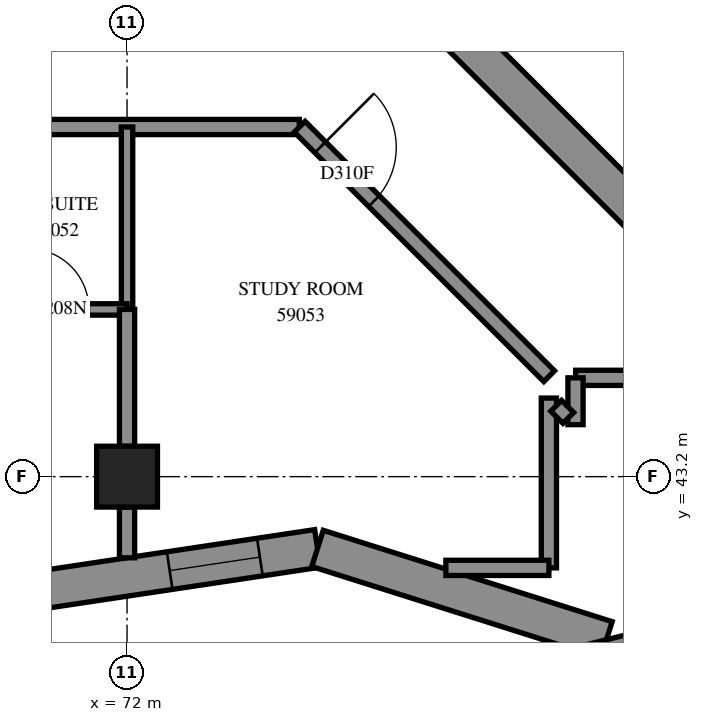
"""IFC4 building model, lengths in metres.
Left out: names, types, materials, properties, quantities, classifications, styles, units other than length and angle.
Written with IfcOpenShell. Run it as: python <this file> out.ifc"""

import sys

from ifc_helpers import new_model, si_unit, direction, frame, frame_2d, origin, origin_2d, place, context, subcontext, project, spatial, polyline, rectangle, outline, extrude, element, fill, save


model = new_model("IFC4")
c1 = context("Model", 3, precision=1e-05, world=origin(), true_north=direction((0.0, 1.0)))
c2 = subcontext(c1, "Body", "Model", "MODEL_VIEW")
j1 = project(units=[si_unit("LENGTHUNIT", "METRE"), si_unit("PLANEANGLEUNIT", "RADIAN")], contexts=[c1])
p1 = place(None, origin())
s1 = spatial("IfcSite", under=j1, at=p1, CompositionType="ELEMENT")
p2 = place(p1, origin())
s2 = spatial("IfcBuilding", under=s1, at=p2, CompositionType="ELEMENT")
p3 = place(p2, frame((0.0, 0.0, 216.8)))
s3 = spatial("IfcBuildingStorey", under=s2, at=p3, CompositionType="ELEMENT", Elevation=216.8)
p4 = place(p3, frame((72.0, 43.2, 0.0), z_axis=(0.0, 0.0, 1.0), x_axis=(1.0, 0.0, 0.0)))
e1 = element("IfcColumn", 1, at=p4, inside=s3, PredefinedType="COLUMN", context=c2, shape_type="SweptSolid", body=[
    extrude(rectangle(XDim=0.8, YDim=0.8, at=origin_2d()), origin(), (0.0, 0.0, 1.0), 3.1),
])
p5 = place(p3, frame((76.124, 49.267, -0.3), z_axis=(0.0, 0.0, 1.0), x_axis=(0.7071067812, -0.7071067812, 0.0)))
e2 = element("IfcWall", 2, at=p5, inside=s3, PredefinedType="SHEAR", context=c2, shape_type="SweptSolid", body=[
    extrude(rectangle(XDim=15.4, YDim=0.5, at=frame_2d((7.7, 0.0))), origin(), (0.0, 0.0, 1.0), 2.7),
])
p6 = place(p3, frame((70.873, 41.711, 0.0), z_axis=(0.0, 0.0, 1.0), x_axis=(0.9889307607, 0.1483777295, 0.0)))
e3 = element("IfcWall", 3, at=p6, inside=s3, PredefinedType="SOLIDWALL", context=c2, shape_type="SweptSolid", body=[
    extrude(outline(polyline([(-0.037, -0.25), (3.615, -0.25), (3.731, 0.25), (0.037, 0.25), (-0.037, -0.25)])), origin(), (0.0, 0.0, 1.0), 3.1),
])
p7 = place(p6, frame((1.706, 0.0, 0.45)))
e4 = element("IfcOpeningElement", 4, at=p7, cuts=e3, PredefinedType="OPENING", context=c2, shape_type="SweptSolid", body=[
    extrude(rectangle(XDim=1.2, YDim=2.5, at=frame_2d((0.6, 1.25))), frame((0.0, 0.26, 0.0), z_axis=(0.0, -1.0, 0.0), x_axis=(1.0, 0.0, 0.0)), (0.0, 0.0, 1.0), 0.52),
])
p8 = place(p3, frame((74.506, 42.256, 0.0), z_axis=(0.0, 0.0, 1.0), x_axis=(0.9534878351, -0.3014314985, 0.0)))
e5 = element("IfcWall", 5, at=p8, inside=s3, PredefinedType="SOLIDWALL", context=c2, shape_type="SweptSolid", body=[
    extrude(outline(polyline([(0.058, -0.25), (3.846, -0.25), (4.126, 0.25), (-0.058, 0.25), (0.058, -0.25)])), origin(), (0.0, 0.0, 1.0), 3.1),
])
p9 = place(p3, frame((78.307, 41.054, 0.0), z_axis=(0.0, 0.0, 1.0), x_axis=(0.2414327988, -0.9704175409, 0.0)))
e6 = element("IfcWall", 6, at=p9, inside=s3, PredefinedType="SOLIDWALL", context=c2, shape_type="SweptSolid", body=[
    extrude(outline(polyline([(0.14, -0.25), (4.796, -0.25), (4.508, 0.25), (-0.14, 0.25), (0.14, -0.25)])), origin(), (0.0, 0.0, 1.0), 3.1),
])
p10 = place(p9, frame((2.303, 0.0, 0.45)))
e7 = element("IfcOpeningElement", 7, at=p10, cuts=e6, PredefinedType="OPENING", context=c2, shape_type="SweptSolid", body=[
    extrude(rectangle(XDim=1.2, YDim=2.5, at=frame_2d((0.6, 1.25))), frame((0.0, 0.26, 0.0), z_axis=(0.0, -1.0, 0.0), x_axis=(1.0, 0.0, 0.0)), (0.0, 0.0, 1.0), 0.52),
])
p11 = place(p3, frame((55.0, 47.8, 0.0), z_axis=(0.0, 0.0, 1.0), x_axis=(1.0, 0.0, 0.0)))
e8 = element("IfcWall", 8, at=p11, inside=s3, PredefinedType="PARTITIONING", context=c2, shape_type="SweptSolid", body=[
    extrude(rectangle(XDim=19.266, YDim=0.2, at=frame_2d((9.633, 0.0))), origin(), (0.0, 0.0, 1.0), 3.1),
])
p12 = place(p11, frame((4.9, 0.0, 0.0)))
e9 = element("IfcOpeningElement", 9, at=p12, cuts=e8, PredefinedType="OPENING", context=c2, shape_type="SweptSolid", body=[
    extrude(rectangle(XDim=0.9, YDim=2.1, at=frame_2d((0.45, 1.05))), frame((0.0, 0.11, 0.0), z_axis=(0.0, -1.0, 0.0), x_axis=(1.0, 0.0, 0.0)), (0.0, 0.0, 1.0), 0.22),
])
p13 = place(p11, frame((8.457, 0.0, 0.0)))
e10 = element("IfcOpeningElement", 10, at=p13, cuts=e8, PredefinedType="OPENING", context=c2, shape_type="SweptSolid", body=[
    extrude(rectangle(XDim=0.9, YDim=2.1, at=frame_2d((0.45, 1.05))), frame((0.0, 0.11, 0.0), z_axis=(0.0, -1.0, 0.0), x_axis=(1.0, 0.0, 0.0)), (0.0, 0.0, 1.0), 0.22),
])
p14 = place(p11, frame((13.8, 0.0, 0.0)))
e11 = element("IfcOpeningElement", 11, at=p14, cuts=e8, PredefinedType="OPENING", context=c2, shape_type="SweptSolid", body=[
    extrude(rectangle(XDim=0.9, YDim=2.1, at=frame_2d((0.45, 1.05))), frame((0.0, 0.11, 0.0), z_axis=(0.0, -1.0, 0.0), x_axis=(1.0, 0.0, 0.0)), (0.0, 0.0, 1.0), 0.22),
])
p15 = place(p3, frame((74.272, 47.803, 0.0), z_axis=(0.0, 0.0, 1.0), x_axis=(0.7071067812, -0.7071067812, 0.0)))
e12 = element("IfcWall", 12, at=p15, inside=s3, PredefinedType="PARTITIONING", context=c2, shape_type="SweptSolid", body=[
    extrude(rectangle(XDim=4.641, YDim=0.2, at=frame_2d((2.321, 0.0))), origin(), (0.0, 0.0, 1.0), 3.1),
])
p16 = place(p15, frame((0.382, 0.0, 0.0)))
e13 = element("IfcOpeningElement", 13, at=p16, cuts=e12, PredefinedType="OPENING", context=c2, shape_type="SweptSolid", body=[
    extrude(rectangle(XDim=1.0, YDim=2.1, at=frame_2d((0.5, 1.05))), frame((0.0, 0.11, 0.0), z_axis=(0.0, -1.0, 0.0), x_axis=(1.0, 0.0, 0.0)), (0.0, 0.0, 1.0), 0.22),
])
p17 = place(p3, frame((77.902, 44.5, 0.0), z_axis=(0.0, 0.0, 1.0), x_axis=(1.0, 0.0, 0.0)))
e14 = element("IfcWall", 14, at=p17, inside=s3, PredefinedType="PARTITIONING", context=c2, shape_type="SweptSolid", body=[
    extrude(rectangle(XDim=2.522, YDim=0.2, at=frame_2d((1.261, 0.0))), origin(), (0.0, 0.0, 1.0), 3.1),
])
p18 = place(p3, frame((72.0, 45.4, 0.0), z_axis=(0.0, 0.0, 1.0), x_axis=(0.0, 1.0, 0.0)))
e15 = element("IfcWall", 15, at=p18, inside=s3, PredefinedType="PARTITIONING", context=c2, shape_type="SweptSolid", body=[
    extrude(rectangle(XDim=2.4, YDim=0.15, at=frame_2d((1.2, 0.0))), origin(), (0.0, 0.0, 1.0), 3.1),
])
p19 = place(p3, frame((77.55, 42.0, 0.0), z_axis=(0.0, 0.0, 1.0), x_axis=(0.0, 1.0, 0.0)))
e16 = element("IfcWall", 16, at=p19, inside=s3, PredefinedType="PARTITIONING", context=c2, shape_type="SweptSolid", body=[
    extrude(rectangle(XDim=2.234, YDim=0.2, at=frame_2d((1.117, 0.0))), origin(), (0.0, 0.0, 1.0), 3.1),
])
p20 = place(p3, frame((70.1, 45.4, 0.0), z_axis=(0.0, 0.0, 1.0), x_axis=(1.0, 0.0, 0.0)))
e17 = element("IfcWall", 17, at=p20, inside=s3, PredefinedType="PARTITIONING", context=c2, shape_type="SweptSolid", body=[
    extrude(rectangle(XDim=1.9, YDim=0.15, at=frame_2d((0.95, 0.0))), origin(), (0.0, 0.0, 1.0), 3.1),
])
p21 = place(p20, frame((0.598, 0.0, 0.0)))
e18 = element("IfcOpeningElement", 18, at=p21, cuts=e17, PredefinedType="OPENING", context=c2, shape_type="SweptSolid", body=[
    extrude(rectangle(XDim=0.8, YDim=2.1, at=frame_2d((0.4, 1.05))), frame((0.0, 0.085, 0.0), z_axis=(0.0, -1.0, 0.0), x_axis=(1.0, 0.0, 0.0)), (0.0, 0.0, 1.0), 0.17),
])
p22 = place(p3, frame((72.0, 43.6, 0.0), z_axis=(0.0, 0.0, 1.0), x_axis=(0.0, 1.0, 0.0)))
e19 = element("IfcWall", 19, at=p22, inside=s3, PredefinedType="PARTITIONING", context=c2, shape_type="SweptSolid", body=[
    extrude(rectangle(XDim=1.8, YDim=0.2, at=frame_2d((0.9, 0.0))), origin(), (0.0, 0.0, 1.0), 3.1),
])
p23 = place(p3, frame((76.194, 42.0, 0.0), z_axis=(0.0, 0.0, 1.0), x_axis=(1.0, 0.0, 0.0)))
e20 = element("IfcWall", 20, at=p23, inside=s3, PredefinedType="PARTITIONING", context=c2, shape_type="SweptSolid", body=[
    extrude(rectangle(XDim=1.356, YDim=0.2, at=frame_2d((0.678, 0.0))), origin(), (0.0, 0.0, 1.0), 3.1),
])
p24 = place(p3, frame((72.0, 42.133, 0.0), z_axis=(0.0, 0.0, 1.0), x_axis=(0.0, 1.0, 0.0)))
e21 = element("IfcWall", 21, at=p24, inside=s3, PredefinedType="PARTITIONING", context=c2, shape_type="SweptSolid", body=[
    extrude(rectangle(XDim=0.667, YDim=0.2, at=frame_2d((0.334, 0.0))), origin(), (0.0, 0.0, 1.0), 3.1),
])
p25 = place(p3, frame((77.9, 43.884, 0.0), z_axis=(0.0, 0.0, 1.0), x_axis=(0.0, 1.0, 0.0)))
e22 = element("IfcWall", 22, at=p25, inside=s3, PredefinedType="PARTITIONING", context=c2, shape_type="SweptSolid", body=[
    extrude(rectangle(XDim=0.616, YDim=0.2, at=frame_2d((0.308, 0.0))), origin(), (0.0, 0.0, 1.0), 3.1),
])
p26 = place(p3, frame((77.646, 44.132, 0.0), z_axis=(0.0, 0.0, 1.0), x_axis=(0.7068844555, -0.707329037, 0.0)))
e23 = element("IfcWall", 23, at=p26, inside=s3, PredefinedType="PARTITIONING", context=c2, shape_type="SweptSolid", body=[
    extrude(rectangle(XDim=0.225, YDim=0.2, at=frame_2d((0.112, 0.0))), origin(), (0.0, 0.0, 1.0), 3.1),
])
p27 = place(p7, origin())
e24 = element("IfcWindow", 24, at=p27, inside=s3, PartitioningType="SINGLE_PANEL", PredefinedType="WINDOW", context=c2, shape_type="SweptSolid", body=[
    extrude(rectangle(XDim=1.2, YDim=2.5, at=frame_2d((0.6, 1.25))), frame((0.0, 0.18, 0.0), z_axis=(0.0, -1.0, 0.0), x_axis=(1.0, 0.0, 0.0)), (0.0, 0.0, 1.0), 0.06),
])
fill(e4, e24)
p28 = place(p21, origin())
e25 = element("IfcDoor", 25, at=p28, inside=s3, OperationType="SINGLE_SWING_RIGHT", PredefinedType="DOOR", context=c2, shape_type="SweptSolid", body=[
    extrude(rectangle(XDim=0.8, YDim=2.1, at=frame_2d((0.4, 1.05))), frame((0.0, 0.025, 0.0), z_axis=(0.0, -1.0, 0.0), x_axis=(1.0, 0.0, 0.0)), (0.0, 0.0, 1.0), 0.05),
])
fill(e18, e25)
p29 = place(p16, origin())
e26 = element("IfcDoor", 26, at=p29, inside=s3, OperationType="SINGLE_SWING_LEFT", PredefinedType="DOOR", context=c2, shape_type="SweptSolid", body=[
    extrude(rectangle(XDim=1.0, YDim=2.1, at=frame_2d((0.5, 1.05))), frame((0.0, 0.025, 0.0), z_axis=(0.0, -1.0, 0.0), x_axis=(1.0, 0.0, 0.0)), (0.0, 0.0, 1.0), 0.05),
])
fill(e13, e26)
save(model, sys.argv[1])
